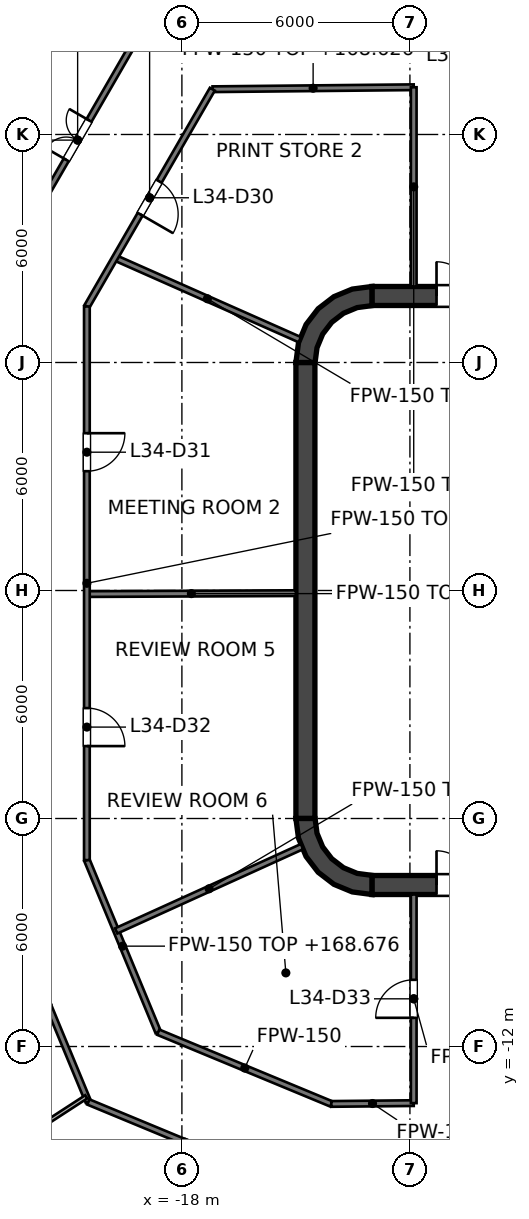
"""IFC4 building model, lengths in metres.
Left out: names, types, materials, properties, quantities, classifications, styles, units other than length and angle.
Written with IfcOpenShell. Run it as: python <this file> out.ifc"""

import sys

from ifc_helpers import new_model, si_unit, direction, frame, frame_2d, origin, place, context, subcontext, project, spatial, polyline, rectangle, outline, extrude, element, fill, save


model = new_model("IFC4")
c1 = context("Model", 3, precision=1e-05, world=origin(), true_north=direction((0.0, 1.0)))
c2 = subcontext(c1, "Body", "Model", "MODEL_VIEW")
j1 = project(units=[si_unit("LENGTHUNIT", "METRE"), si_unit("PLANEANGLEUNIT", "RADIAN")], contexts=[c1])
p1 = place(None, origin())
s1 = spatial("IfcSite", under=j1, at=p1, CompositionType="ELEMENT")
p2 = place(p1, origin())
s2 = spatial("IfcBuilding", under=s1, at=p2, CompositionType="ELEMENT")
p3 = place(p2, frame((0.0, 0.0, 165.6)))
s3 = spatial("IfcBuildingStorey", under=s2, at=p3, CompositionType="ELEMENT", Elevation=165.6)
p4 = place(p3, frame((-13.0, 7.75, 0.0), z_axis=(0.0, 0.0, 1.0), x_axis=(1.0, 0.0, 0.0)))
e1 = element("IfcWall", 1, at=p4, inside=s3, PredefinedType="SHEAR", context=c2, shape_type="SweptSolid", body=[
    extrude(rectangle(XDim=26.0, YDim=0.5, at=frame_2d((13.0, 0.0))), origin(), (0.0, 0.0, 1.0), 4.0),
])
p5 = place(p4, frame((1.7, 0.0, 0.0)))
e2 = element("IfcOpeningElement", 2, at=p5, cuts=e1, PredefinedType="OPENING", context=c2, shape_type="SweptSolid", body=[
    extrude(rectangle(XDim=1.8, YDim=2.1, at=frame_2d((0.9, 1.05))), frame((0.0, 0.25, 0.0), z_axis=(0.0, -1.0, 0.0), x_axis=(1.0, 0.0, 0.0)), (0.0, 0.0, 1.0), 0.5),
])
p6 = place(p4, frame((22.5, 0.0, 0.0)))
e3 = element("IfcOpeningElement", 3, at=p6, cuts=e1, PredefinedType="OPENING", context=c2, shape_type="SweptSolid", body=[
    extrude(rectangle(XDim=1.8, YDim=2.1, at=frame_2d((0.9, 1.05))), frame((0.0, 0.25, 0.0), z_axis=(0.0, -1.0, 0.0), x_axis=(1.0, 0.0, 0.0)), (0.0, 0.0, 1.0), 0.5),
])
p7 = place(p3, frame((-13.0, -7.75, 0.0), z_axis=(0.0, 0.0, 1.0), x_axis=(1.0, 0.0, 0.0)))
e4 = element("IfcWall", 4, at=p7, inside=s3, PredefinedType="SHEAR", context=c2, shape_type="SweptSolid", body=[
    extrude(rectangle(XDim=26.0, YDim=0.5, at=frame_2d((13.0, 0.0))), origin(), (0.0, 0.0, 1.0), 4.0),
])
p8 = place(p7, frame((1.7, 0.0, 0.0)))
e5 = element("IfcOpeningElement", 5, at=p8, cuts=e4, PredefinedType="OPENING", context=c2, shape_type="SweptSolid", body=[
    extrude(rectangle(XDim=1.8, YDim=2.1, at=frame_2d((0.9, 1.05))), frame((0.0, 0.25, 0.0), z_axis=(0.0, -1.0, 0.0), x_axis=(1.0, 0.0, 0.0)), (0.0, 0.0, 1.0), 0.5),
])
p9 = place(p7, frame((22.5, 0.0, 0.0)))
e6 = element("IfcOpeningElement", 6, at=p9, cuts=e4, PredefinedType="OPENING", context=c2, shape_type="SweptSolid", body=[
    extrude(rectangle(XDim=1.8, YDim=2.1, at=frame_2d((0.9, 1.05))), frame((0.0, 0.25, 0.0), z_axis=(0.0, -1.0, 0.0), x_axis=(1.0, 0.0, 0.0)), (0.0, 0.0, 1.0), 0.5),
])
p10 = place(p3, frame((-14.75, -6.0, 0.0), z_axis=(0.0, 0.0, 1.0), x_axis=(0.0, 1.0, 0.0)))
e7 = element("IfcWall", 7, at=p10, inside=s3, PredefinedType="SHEAR", context=c2, shape_type="SweptSolid", body=[
    extrude(rectangle(XDim=12.0, YDim=0.5, at=frame_2d((6.0, 0.0))), origin(), (0.0, 0.0, 1.0), 4.0),
])
p11 = place(p3, origin())
e8 = element("IfcWall", 8, at=p11, inside=s3, PredefinedType="SHEAR", context=c2, shape_type="SweptSolid", body=[
    extrude(outline(polyline([(-15.0, 6.0), (-14.496, 6.0), (-14.445, 6.387), (-14.295, 6.748), (-14.058, 7.058), (-13.748, 7.295), (-13.387, 7.445), (-13.0, 7.496), (-13.0, 8.0), (-13.518, 7.932), (-14.0, 7.732), (-14.414, 7.414), (-14.732, 7.0), (-14.932, 6.518), (-15.0, 6.0)])), origin(), (0.0, 0.0, 1.0), 4.0),
])
e9 = element("IfcWall", 9, at=p11, inside=s3, PredefinedType="SHEAR", context=c2, shape_type="SweptSolid", body=[
    extrude(outline(polyline([(-13.0, -8.0), (-13.0, -7.496), (-13.387, -7.445), (-13.748, -7.295), (-14.058, -7.058), (-14.295, -6.748), (-14.445, -6.387), (-14.496, -6.0), (-15.0, -6.0), (-14.932, -6.518), (-14.732, -7.0), (-14.414, -7.414), (-14.0, -7.732), (-13.518, -7.932), (-13.0, -8.0)])), origin(), (0.0, 0.0, 1.0), 4.0),
])
p12 = place(p3, frame((-11.8, -7.5, 0.0), z_axis=(0.0, 0.0, 1.0), x_axis=(0.0, 1.0, 0.0)))
e10 = element("IfcWall", 10, at=p12, inside=s3, PredefinedType="SOLIDWALL", context=c2, shape_type="SweptSolid", body=[
    extrude(rectangle(XDim=15.0, YDim=0.4, at=frame_2d((7.5, 0.0))), origin(), (0.0, 0.0, 1.0), 3.85),
])
p13 = place(p12, frame((11.3, 0.0, 0.0)))
e11 = element("IfcOpeningElement", 11, at=p13, cuts=e10, PredefinedType="OPENING", context=c2, shape_type="SweptSolid", body=[
    extrude(rectangle(XDim=1.1, YDim=2.1, at=frame_2d((0.55, 1.05))), frame((0.0, 0.2, 0.0), z_axis=(0.0, -1.0, 0.0), x_axis=(1.0, 0.0, 0.0)), (0.0, 0.0, 1.0), 0.4),
])
p14 = place(p12, frame((8.4, 0.0, 0.0)))
e12 = element("IfcOpeningElement", 12, at=p14, cuts=e10, PredefinedType="OPENING", context=c2, shape_type="SweptSolid", body=[
    extrude(rectangle(XDim=1.1, YDim=2.1, at=frame_2d((0.55, 1.05))), frame((0.0, 0.2, 0.0), z_axis=(0.0, -1.0, 0.0), x_axis=(1.0, 0.0, 0.0)), (0.0, 0.0, 1.0), 0.4),
])
p15 = place(p12, frame((5.5, 0.0, 0.0)))
e13 = element("IfcOpeningElement", 13, at=p15, cuts=e10, PredefinedType="OPENING", context=c2, shape_type="SweptSolid", body=[
    extrude(rectangle(XDim=1.1, YDim=2.1, at=frame_2d((0.55, 1.05))), frame((0.0, 0.2, 0.0), z_axis=(0.0, -1.0, 0.0), x_axis=(1.0, 0.0, 0.0)), (0.0, 0.0, 1.0), 0.4),
])
p16 = place(p12, frame((13.697, 0.0, 0.0)))
e14 = element("IfcOpeningElement", 14, at=p16, cuts=e10, PredefinedType="OPENING", context=c2, shape_type="SweptSolid", body=[
    extrude(rectangle(XDim=0.9, YDim=2.1, at=frame_2d((0.45, 1.05))), frame((0.0, 0.2, 0.0), z_axis=(0.0, -1.0, 0.0), x_axis=(1.0, 0.0, 0.0)), (0.0, 0.0, 1.0), 0.4),
])
p17 = place(p12, frame((0.403, 0.0, 0.0)))
e15 = element("IfcOpeningElement", 15, at=p17, cuts=e10, PredefinedType="OPENING", context=c2, shape_type="SweptSolid", body=[
    extrude(rectangle(XDim=0.9, YDim=2.1, at=frame_2d((0.45, 1.05))), frame((0.0, 0.2, 0.0), z_axis=(0.0, -1.0, 0.0), x_axis=(1.0, 0.0, 0.0)), (0.0, 0.0, 1.0), 0.4),
])
e16 = element("IfcWall", 16, at=p11, inside=s3, PredefinedType="SOLIDWALL", context=c2, shape_type="SweptSolid", body=[
    extrude(outline(polyline([(-12.0, -5.925), (-12.0, -5.675), (-14.25, -5.675), (-14.25, -3.025), (-12.0, -3.025), (-12.0, -2.775), (-14.25, -2.775), (-14.25, -0.125), (-12.0, -0.125), (-12.0, 0.125), (-14.25, 0.125), (-14.25, 2.775), (-12.0, 2.775), (-12.0, 3.025), (-14.25, 3.025), (-14.25, 5.675), (-12.0, 5.675), (-12.0, 5.925), (-14.25, 5.925), (-14.5, 5.925), (-14.5, 5.675), (-14.5, 3.025), (-14.5, 2.775), (-14.5, 0.125), (-14.5, -0.125), (-14.5, -2.775), (-14.5, -3.025), (-14.5, -5.675), (-14.5, -5.925), (-14.25, -5.925), (-12.0, -5.925)])), origin(), (0.0, 0.0, 1.0), 3.85),
])
p18 = place(p3, frame((-22.9, -7.572, 0.0), z_axis=(0.0, 0.0, 1.0), x_axis=(0.382860357704, -0.923806227788, 0.0)))
e17 = element("IfcWall", 17, at=p18, inside=s3, PredefinedType="PARTITIONING", context=c2, shape_type="SweptSolid", body=[
    extrude(rectangle(XDim=6.374, YDim=0.15, at=frame_2d((3.187, 0.0))), origin(), (0.0, 0.0, 1.0), 3.076),
])
p19 = place(p18, frame((2.638, 0.0, 0.0)))
e18 = element("IfcOpeningElement", 18, at=p19, cuts=e17, PredefinedType="OPENING", context=c2, shape_type="SweptSolid", body=[
    extrude(rectangle(XDim=1.0, YDim=2.1, at=frame_2d((0.5, 1.05))), frame((0.0, 0.075, 0.0), z_axis=(0.0, -1.0, 0.0), x_axis=(1.0, 0.0, 0.0)), (0.0, 0.0, 1.0), 0.15),
])
p20 = place(p3, frame((-20.5, -7.095, 0.0), z_axis=(0.0, 0.0, 1.0), x_axis=(0.382878184095, -0.923798839653, 0.0)))
e19 = element("IfcWall", 19, at=p20, inside=s3, PredefinedType="PARTITIONING", context=c2, shape_type="SweptSolid", body=[
    extrude(rectangle(XDim=4.902, YDim=0.15, at=frame_2d((2.451, 0.0))), origin(), (0.0, 0.0, 1.0), 3.076),
])
p21 = place(p3, frame((-19.76, 8.755, 0.0), z_axis=(0.0, 0.0, 1.0), x_axis=(0.91424834547, -0.405154245695, 0.0)))
e20 = element("IfcWall", 20, at=p21, inside=s3, PredefinedType="PARTITIONING", context=c2, shape_type="SweptSolid", body=[
    extrude(rectangle(XDim=5.318, YDim=0.15, at=frame_2d((2.659, 0.0))), origin(), (0.0, 0.0, 1.0), 3.026),
])
p22 = place(p3, frame((-20.46, -13.46, 0.0), z_axis=(0.0, 0.0, 1.0), x_axis=(0.923801547606, -0.382871650349, 0.0)))
e21 = element("IfcWall", 21, at=p22, inside=s3, PredefinedType="PARTITIONING", context=c2, shape_type="SweptSolid", body=[
    extrude(rectangle(XDim=6.415, YDim=0.15, at=frame_2d((3.208, 0.0))), origin(), (0.0, 0.0, 1.0), 2.927),
])
p23 = place(p22, frame((2.707, 0.0, 0.0)))
e22 = element("IfcOpeningElement", 22, at=p23, cuts=e21, PredefinedType="OPENING", context=c2, shape_type="SweptSolid", body=[
    extrude(rectangle(XDim=1.0, YDim=2.1, at=frame_2d((0.5, 1.05))), frame((0.0, 0.075, 0.0), z_axis=(0.0, -1.0, 0.0), x_axis=(1.0, 0.0, 0.0)), (0.0, 0.0, 1.0), 0.15),
])
p24 = place(p3, frame((-18.623, -11.623, 0.0), z_axis=(0.0, 0.0, 1.0), x_axis=(0.923791670587, -0.38289548098, 0.0)))
e23 = element("IfcWall", 23, at=p24, inside=s3, PredefinedType="PARTITIONING", context=c2, shape_type="SweptSolid", body=[
    extrude(rectangle(XDim=4.931, YDim=0.15, at=frame_2d((2.465, 0.0))), origin(), (0.0, 0.0, 1.0), 2.927),
])
p25 = place(p3, frame((-20.5, -0.094, 0.0), z_axis=(0.0, 0.0, 1.0), x_axis=(0.999990148138, 0.004438876723, 0.0)))
e24 = element("IfcWall", 24, at=p25, inside=s3, PredefinedType="PARTITIONING", context=c2, shape_type="SweptSolid", body=[
    extrude(rectangle(XDim=5.5, YDim=0.15, at=frame_2d((2.75, 0.0))), origin(), (0.0, 0.0, 1.0), 2.995),
])
p26 = place(p3, frame((-14.068, -13.511, 0.0), z_axis=(0.0, 0.0, 1.0), x_axis=(0.999950911515, 0.009908307647, 0.0)))
e25 = element("IfcWall", 25, at=p26, inside=s3, PredefinedType="PARTITIONING", context=c2, shape_type="SweptSolid", body=[
    extrude(rectangle(XDim=2.168, YDim=0.15, at=frame_2d((1.084, 0.0))), origin(), (0.0, 0.0, 1.0), 3.076),
])
p27 = place(p3, frame((-17.194, 13.191, 0.0), z_axis=(0.0, 0.0, 1.0), x_axis=(0.999950853109, 0.009914200296, 0.0)))
e26 = element("IfcWall", 26, at=p27, inside=s3, PredefinedType="PARTITIONING", context=c2, shape_type="SweptSolid", body=[
    extrude(rectangle(XDim=5.294, YDim=0.15, at=frame_2d((2.647, 0.0))), origin(), (0.0, 0.0, 1.0), 3.026),
])
p28 = place(p3, frame((-19.728, -8.958, 0.0), z_axis=(0.0, 0.0, 1.0), x_axis=(0.910629511797, 0.413223779863, 0.0)))
e27 = element("IfcWall", 27, at=p28, inside=s3, PredefinedType="PARTITIONING", context=c2, shape_type="SweptSolid", body=[
    extrude(rectangle(XDim=5.368, YDim=0.15, at=frame_2d((2.684, 0.0))), origin(), (0.0, 0.0, 1.0), 3.85),
])
p29 = place(p3, frame((-20.5, 7.474, 0.0), z_axis=(0.0, 0.0, 1.0), x_axis=(0.500012665616, 0.866018091164, 0.0)))
e28 = element("IfcWall", 28, at=p29, inside=s3, PredefinedType="PARTITIONING", context=c2, shape_type="SweptSolid", body=[
    extrude(rectangle(XDim=6.602, YDim=0.15, at=frame_2d((3.301, 0.0))), origin(), (0.0, 0.0, 1.0), 2.877),
])
p30 = place(p29, frame((2.803, 0.0, 0.0)))
e29 = element("IfcOpeningElement", 29, at=p30, cuts=e28, PredefinedType="OPENING", context=c2, shape_type="SweptSolid", body=[
    extrude(rectangle(XDim=1.0, YDim=2.1, at=frame_2d((0.5, 1.05))), frame((0.0, 0.075, 0.0), z_axis=(0.0, -1.0, 0.0), x_axis=(1.0, 0.0, 0.0)), (0.0, 0.0, 1.0), 0.15),
])
p31 = place(p3, frame((-22.9, 8.117, 0.0), z_axis=(0.0, 0.0, 1.0), x_axis=(0.500017275495, 0.866015429543, 0.0)))
e30 = element("IfcWall", 30, at=p31, inside=s3, PredefinedType="PARTITIONING", context=c2, shape_type="SweptSolid", body=[
    extrude(rectangle(XDim=8.626, YDim=0.15, at=frame_2d((4.313, 0.0))), origin(), (0.0, 0.0, 1.0), 2.877),
])
p32 = place(p31, frame((3.713, 0.0, 0.0)))
e31 = element("IfcOpeningElement", 31, at=p32, cuts=e30, PredefinedType="OPENING", context=c2, shape_type="SweptSolid", body=[
    extrude(rectangle(XDim=1.2, YDim=2.1, at=frame_2d((0.6, 1.05))), frame((0.0, 0.075, 0.0), z_axis=(0.0, -1.0, 0.0), x_axis=(1.0, 0.0, 0.0)), (0.0, 0.0, 1.0), 0.15),
])
p33 = place(p3, frame((-11.9, -13.49, 0.0), z_axis=(0.0, 0.0, 1.0), x_axis=(0.0, 1.0, 0.0)))
e32 = element("IfcWall", 32, at=p33, inside=s3, PredefinedType="PARTITIONING", context=c2, shape_type="SweptSolid", body=[
    extrude(rectangle(XDim=5.49, YDim=0.15, at=frame_2d((2.745, 0.0))), origin(), (0.0, 0.0, 1.0), 2.927),
])
p34 = place(p33, frame((2.245, 0.0, 0.0)))
e33 = element("IfcOpeningElement", 33, at=p34, cuts=e32, PredefinedType="OPENING", context=c2, shape_type="SweptSolid", body=[
    extrude(rectangle(XDim=1.0, YDim=2.1, at=frame_2d((0.5, 1.05))), frame((0.0, 0.075, 0.0), z_axis=(0.0, -1.0, 0.0), x_axis=(1.0, 0.0, 0.0)), (0.0, 0.0, 1.0), 0.15),
])
p35 = place(p3, frame((-11.9, 8.0, 0.0), z_axis=(0.0, 0.0, 1.0), x_axis=(0.0, 1.0, 0.0)))
e34 = element("IfcWall", 34, at=p35, inside=s3, PredefinedType="PARTITIONING", context=c2, shape_type="SweptSolid", body=[
    extrude(rectangle(XDim=5.243, YDim=0.15, at=frame_2d((2.622, 0.0))), origin(), (0.0, 0.0, 1.0), 2.877),
])
p36 = place(p3, frame((-20.5, -7.095, 0.0), z_axis=(0.0, 0.0, 1.0), x_axis=(0.0, 1.0, 0.0)))
e35 = element("IfcWall", 35, at=p36, inside=s3, PredefinedType="PARTITIONING", context=c2, shape_type="SweptSolid", body=[
    extrude(rectangle(XDim=14.569, YDim=0.15, at=frame_2d((7.285, 0.0))), origin(), (0.0, 0.0, 1.0), 2.877),
])
p37 = place(p36, frame((10.234, 0.0, 0.0)))
e36 = element("IfcOpeningElement", 36, at=p37, cuts=e35, PredefinedType="OPENING", context=c2, shape_type="SweptSolid", body=[
    extrude(rectangle(XDim=1.0, YDim=2.1, at=frame_2d((0.5, 1.05))), frame((0.0, 0.075, 0.0), z_axis=(0.0, -1.0, 0.0), x_axis=(1.0, 0.0, 0.0)), (0.0, 0.0, 1.0), 0.15),
])
p38 = place(p36, frame((3.0, 0.0, 0.0)))
e37 = element("IfcOpeningElement", 37, at=p38, cuts=e35, PredefinedType="OPENING", context=c2, shape_type="SweptSolid", body=[
    extrude(rectangle(XDim=1.0, YDim=2.1, at=frame_2d((0.5, 1.05))), frame((0.0, 0.075, 0.0), z_axis=(0.0, -1.0, 0.0), x_axis=(1.0, 0.0, 0.0)), (0.0, 0.0, 1.0), 0.15),
])
p39 = place(p3, frame((-23.715, -15.401, 0.0), z_axis=(0.0, 0.0, 1.0), x_axis=(0.838658579265, 0.544657495519, 0.0)))
e38 = element("IfcWall", 38, at=p39, inside=s3, PredefinedType="PARTITIONING", context=c2, shape_type="SweptSolid", body=[
    extrude(rectangle(XDim=3.813, YDim=0.1, at=frame_2d((1.907, 0.0))), origin(), (0.0, 0.0, 1.0), 3.475),
])
p40 = place(p13, origin())
e39 = element("IfcDoor", 39, at=p40, inside=s3, OperationType="DOUBLE_DOOR_SLIDING", PredefinedType="DOOR", context=c2, shape_type="SweptSolid", body=[
    extrude(rectangle(XDim=1.1, YDim=2.1, at=frame_2d((0.55, 1.05))), frame((0.0, 0.025, 0.0), z_axis=(0.0, -1.0, 0.0), x_axis=(1.0, 0.0, 0.0)), (0.0, 0.0, 1.0), 0.05),
])
fill(e11, e39)
p41 = place(p14, origin())
e40 = element("IfcDoor", 40, at=p41, inside=s3, OperationType="DOUBLE_DOOR_SLIDING", PredefinedType="DOOR", context=c2, shape_type="SweptSolid", body=[
    extrude(rectangle(XDim=1.1, YDim=2.1, at=frame_2d((0.55, 1.05))), frame((0.0, 0.025, 0.0), z_axis=(0.0, -1.0, 0.0), x_axis=(1.0, 0.0, 0.0)), (0.0, 0.0, 1.0), 0.05),
])
fill(e12, e40)
p42 = place(p15, origin())
e41 = element("IfcDoor", 41, at=p42, inside=s3, OperationType="DOUBLE_DOOR_SLIDING", PredefinedType="DOOR", context=c2, shape_type="SweptSolid", body=[
    extrude(rectangle(XDim=1.1, YDim=2.1, at=frame_2d((0.55, 1.05))), frame((0.0, 0.025, 0.0), z_axis=(0.0, -1.0, 0.0), x_axis=(1.0, 0.0, 0.0)), (0.0, 0.0, 1.0), 0.05),
])
fill(e13, e41)
p43 = place(p16, origin())
e42 = element("IfcDoor", 42, at=p43, inside=s3, OperationType="SINGLE_SWING_LEFT", PredefinedType="DOOR", context=c2, shape_type="SweptSolid", body=[
    extrude(rectangle(XDim=0.9, YDim=2.1, at=frame_2d((0.45, 1.05))), frame((0.0, 0.025, 0.0), z_axis=(0.0, -1.0, 0.0), x_axis=(1.0, 0.0, 0.0)), (0.0, 0.0, 1.0), 0.05),
])
fill(e14, e42)
p44 = place(p17, origin())
e43 = element("IfcDoor", 43, at=p44, inside=s3, OperationType="SINGLE_SWING_LEFT", PredefinedType="DOOR", context=c2, shape_type="SweptSolid", body=[
    extrude(rectangle(XDim=0.9, YDim=2.1, at=frame_2d((0.45, 1.05))), frame((0.0, 0.025, 0.0), z_axis=(0.0, -1.0, 0.0), x_axis=(1.0, 0.0, 0.0)), (0.0, 0.0, 1.0), 0.05),
])
fill(e15, e43)
p45 = place(p5, origin())
e44 = element("IfcDoor", 44, at=p45, inside=s3, OperationType="DOUBLE_DOOR_SINGLE_SWING", PredefinedType="DOOR", context=c2, shape_type="SweptSolid", body=[
    extrude(rectangle(XDim=1.8, YDim=2.1, at=frame_2d((0.9, 1.05))), frame((0.0, 0.025, 0.0), z_axis=(0.0, -1.0, 0.0), x_axis=(1.0, 0.0, 0.0)), (0.0, 0.0, 1.0), 0.05),
])
fill(e2, e44)
p46 = place(p8, origin())
e45 = element("IfcDoor", 45, at=p46, inside=s3, OperationType="DOUBLE_DOOR_SINGLE_SWING", PredefinedType="DOOR", context=c2, shape_type="SweptSolid", body=[
    extrude(rectangle(XDim=1.8, YDim=2.1, at=frame_2d((0.9, 1.05))), frame((0.0, 0.025, 0.0), z_axis=(0.0, -1.0, 0.0), x_axis=(1.0, 0.0, 0.0)), (0.0, 0.0, 1.0), 0.05),
])
fill(e5, e45)
p47 = place(p30, origin())
e46 = element("IfcDoor", 46, at=p47, inside=s3, OperationType="SINGLE_SWING_LEFT", PredefinedType="DOOR", context=c2, shape_type="SweptSolid", body=[
    extrude(rectangle(XDim=1.0, YDim=2.1, at=frame_2d((0.5, 1.05))), frame((0.0, 0.025, 0.0), z_axis=(0.0, -1.0, 0.0), x_axis=(1.0, 0.0, 0.0)), (0.0, 0.0, 1.0), 0.05),
])
fill(e29, e46)
p48 = place(p37, origin())
e47 = element("IfcDoor", 47, at=p48, inside=s3, OperationType="SINGLE_SWING_RIGHT", PredefinedType="DOOR", context=c2, shape_type="SweptSolid", body=[
    extrude(rectangle(XDim=1.0, YDim=2.1, at=frame_2d((0.5, 1.05))), frame((0.0, 0.025, 0.0), z_axis=(0.0, -1.0, 0.0), x_axis=(1.0, 0.0, 0.0)), (0.0, 0.0, 1.0), 0.05),
])
fill(e36, e47)
p49 = place(p38, origin())
e48 = element("IfcDoor", 48, at=p49, inside=s3, OperationType="SINGLE_SWING_LEFT", PredefinedType="DOOR", context=c2, shape_type="SweptSolid", body=[
    extrude(rectangle(XDim=1.0, YDim=2.1, at=frame_2d((0.5, 1.05))), frame((0.0, 0.025, 0.0), z_axis=(0.0, -1.0, 0.0), x_axis=(1.0, 0.0, 0.0)), (0.0, 0.0, 1.0), 0.05),
])
fill(e37, e48)
p50 = place(p34, origin())
e49 = element("IfcDoor", 49, at=p50, inside=s3, OperationType="SINGLE_SWING_LEFT", PredefinedType="DOOR", context=c2, shape_type="SweptSolid", body=[
    extrude(rectangle(XDim=1.0, YDim=2.1, at=frame_2d((0.5, 1.05))), frame((0.0, 0.025, 0.0), z_axis=(0.0, -1.0, 0.0), x_axis=(1.0, 0.0, 0.0)), (0.0, 0.0, 1.0), 0.05),
])
fill(e33, e49)
p51 = place(p32, origin())
e50 = element("IfcDoor", 50, at=p51, inside=s3, OperationType="DOUBLE_DOOR_SINGLE_SWING", PredefinedType="DOOR", context=c2, shape_type="SweptSolid", body=[
    extrude(rectangle(XDim=1.2, YDim=2.1, at=frame_2d((0.6, 1.05))), frame((0.0, 0.025, 0.0), z_axis=(0.0, -1.0, 0.0), x_axis=(1.0, 0.0, 0.0)), (0.0, 0.0, 1.0), 0.05),
])
fill(e31, e50)
save(model, sys.argv[1])
